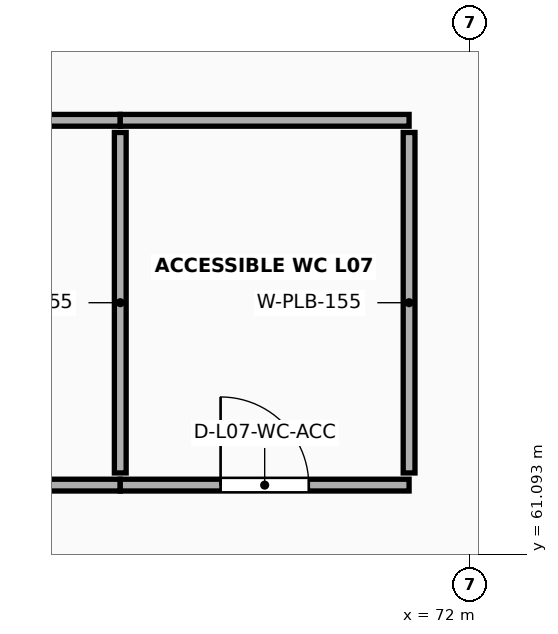
"""IFC4 building model, lengths in metres.
Left out: names, types, materials, properties, quantities, classifications, styles, units other than length and angle.
Written with IfcOpenShell. Run it as: python <this file> out.ifc"""

import sys

from ifc_helpers import new_model, si_unit, direction, frame, frame_2d, origin, place, context, subcontext, project, spatial, rectangle, extrude, element, fill, save


model = new_model("IFC4")
c1 = context("Model", 3, precision=1e-05, world=origin(), true_north=direction((0.0, 1.0)))
c2 = subcontext(c1, "Body", "Model", "MODEL_VIEW")
j1 = project(units=[si_unit("LENGTHUNIT", "METRE"), si_unit("PLANEANGLEUNIT", "RADIAN")], contexts=[c1])
p1 = place(None, origin())
s1 = spatial("IfcSite", under=j1, at=p1, CompositionType="ELEMENT")
p2 = place(p1, origin())
s2 = spatial("IfcBuilding", under=s1, at=p2, CompositionType="ELEMENT")
p3 = place(p2, frame((0.0, 0.0, 28.6)))
s3 = spatial("IfcBuildingStorey", under=s2, at=p3, CompositionType="ELEMENT", Elevation=28.6)
p4 = place(p3, frame((62.0, 62.0, 0.0), z_axis=(0.0, 0.0, 1.0), x_axis=(1.0, 0.0, 0.0)))
e1 = element("IfcWall", 1, at=p4, inside=s3, PredefinedType="PLUMBINGWALL", context=c2, shape_type="SweptSolid", body=[
    extrude(rectangle(XDim=5.4, YDim=0.155, at=frame_2d((2.7, 0.0))), origin(), (0.0, 0.0, 1.0), 2.64),
])
p5 = place(p4, frame((2.145, 0.0, 0.0)))
e2 = element("IfcOpeningElement", 2, at=p5, cuts=e1, PredefinedType="OPENING", context=c2, shape_type="SweptSolid", body=[
    extrude(rectangle(XDim=1.11, YDim=2.21, at=frame_2d((0.555, 1.105))), frame((0.0, 0.093, 0.0), z_axis=(0.0, -1.0, 0.0), x_axis=(1.0, 0.0, 0.0)), (0.0, 0.0, 1.0), 0.185),
])
p6 = place(p3, frame((62.0, 66.8, 0.0), z_axis=(0.0, 0.0, 1.0), x_axis=(1.0, 0.0, 0.0)))
e3 = element("IfcWall", 3, at=p6, inside=s3, PredefinedType="PLUMBINGWALL", context=c2, shape_type="SweptSolid", body=[
    extrude(rectangle(XDim=5.4, YDim=0.155, at=frame_2d((2.7, 0.0))), origin(), (0.0, 0.0, 1.0), 2.64),
])
p7 = place(p3, frame((67.4, 62.16, 0.0), z_axis=(0.0, 0.0, 1.0), x_axis=(0.0, 1.0, 0.0)))
e4 = element("IfcWall", 4, at=p7, inside=s3, PredefinedType="PLUMBINGWALL", context=c2, shape_type="SweptSolid", body=[
    extrude(rectangle(XDim=4.48, YDim=0.155, at=frame_2d((2.24, 0.0))), origin(), (0.0, 0.0, 1.0), 2.64),
])
p8 = place(p3, frame((67.4, 62.0, 0.0), z_axis=(0.0, 0.0, 1.0), x_axis=(1.0, 0.0, 0.0)))
e5 = element("IfcWall", 5, at=p8, inside=s3, PredefinedType="PLUMBINGWALL", context=c2, shape_type="SweptSolid", body=[
    extrude(rectangle(XDim=3.8, YDim=0.155, at=frame_2d((1.9, 0.0))), origin(), (0.0, 0.0, 1.0), 2.64),
])
p9 = place(p8, frame((1.32, 0.0, 0.0)))
e6 = element("IfcOpeningElement", 6, at=p9, cuts=e5, PredefinedType="OPENING", context=c2, shape_type="SweptSolid", body=[
    extrude(rectangle(XDim=1.16, YDim=2.23, at=frame_2d((0.58, 1.115))), frame((0.0, 0.093, 0.0), z_axis=(0.0, -1.0, 0.0), x_axis=(1.0, 0.0, 0.0)), (0.0, 0.0, 1.0), 0.185),
])
p10 = place(p3, frame((67.4, 66.8, 0.0), z_axis=(0.0, 0.0, 1.0), x_axis=(1.0, 0.0, 0.0)))
e7 = element("IfcWall", 7, at=p10, inside=s3, PredefinedType="PLUMBINGWALL", context=c2, shape_type="SweptSolid", body=[
    extrude(rectangle(XDim=3.8, YDim=0.155, at=frame_2d((1.9, 0.0))), origin(), (0.0, 0.0, 1.0), 2.64),
])
p11 = place(p3, frame((71.2, 62.16, 0.0), z_axis=(0.0, 0.0, 1.0), x_axis=(0.0, 1.0, 0.0)))
e8 = element("IfcWall", 8, at=p11, inside=s3, PredefinedType="PLUMBINGWALL", context=c2, shape_type="SweptSolid", body=[
    extrude(rectangle(XDim=4.48, YDim=0.155, at=frame_2d((2.24, 0.0))), origin(), (0.0, 0.0, 1.0), 2.64),
])
p12 = place(p9, origin())
e9 = element("IfcDoor", 9, at=p12, inside=s3, OperationType="SINGLE_SWING_LEFT", PredefinedType="DOOR", context=c2, shape_type="SweptSolid", body=[
    extrude(rectangle(XDim=1.16, YDim=2.23, at=frame_2d((0.58, 1.115))), frame((0.0, 0.025, 0.0), z_axis=(0.0, -1.0, 0.0), x_axis=(1.0, 0.0, 0.0)), (0.0, 0.0, 1.0), 0.05),
])
fill(e6, e9)
save(model, sys.argv[1])
